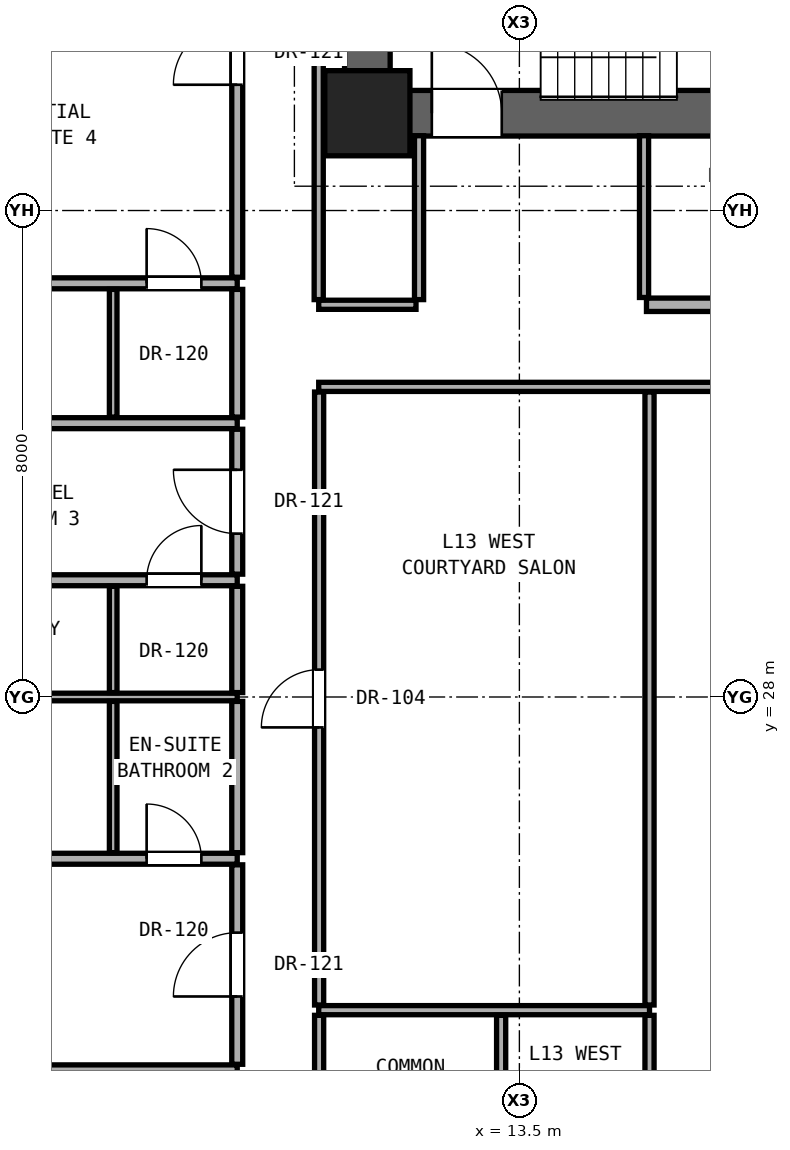
"""IFC4 building model, lengths in metres.
Left out: names, types, materials, properties, quantities, classifications, styles, units other than length and angle.
Written with IfcOpenShell. Run it as: python <this file> out.ifc"""

import sys

from ifc_helpers import new_model, si_unit, direction, frame, frame_2d, origin, origin_2d, place, context, subcontext, project, spatial, rectangle, extrude, element, fill, save


model = new_model("IFC4")
c1 = context("Model", 3, precision=1e-05, world=origin(), true_north=direction((0.0, 1.0)))
c2 = subcontext(c1, "Body", "Model", "MODEL_VIEW")
j1 = project(units=[si_unit("LENGTHUNIT", "METRE"), si_unit("PLANEANGLEUNIT", "RADIAN")], contexts=[c1])
p1 = place(None, origin())
s1 = spatial("IfcSite", under=j1, at=p1, CompositionType="ELEMENT")
p2 = place(p1, origin())
s2 = spatial("IfcBuilding", under=s1, at=p2, CompositionType="ELEMENT")
p3 = place(p2, frame((0.0, 0.0, 48.8)))
s3 = spatial("IfcBuildingStorey", under=s2, at=p3, CompositionType="ELEMENT", Elevation=48.8)
p4 = place(p3, frame((11.0, 37.6, 0.0), z_axis=(0.0, 0.0, 1.0), x_axis=(1.0, 0.0, 0.0)))
e1 = element("IfcColumn", 1, at=p4, inside=s3, PredefinedType="COLUMN", context=c2, shape_type="SweptSolid", body=[
    extrude(rectangle(XDim=1.4, YDim=1.4, at=origin_2d()), origin(), (0.0, 0.0, 1.0), 3.3),
])
p5 = place(p3, frame((11.0, 37.6, 0.0), z_axis=(0.0, 0.0, 1.0), x_axis=(0.0, 1.0, 0.0)))
e2 = element("IfcWall", 2, at=p5, inside=s3, PredefinedType="SHEAR", context=c2, shape_type="SweptSolid", body=[
    extrude(rectangle(XDim=6.0, YDim=0.75, at=frame_2d((3.0, 0.0))), origin(), (0.0, 0.0, 1.0), 3.06),
])
p6 = place(p3, frame((11.0, 37.6, 0.0), z_axis=(0.0, 0.0, 1.0), x_axis=(1.0, 0.0, 0.0)))
e3 = element("IfcWall", 3, at=p6, inside=s3, PredefinedType="SHEAR", context=c2, shape_type="SweptSolid", body=[
    extrude(rectangle(XDim=19.0, YDim=0.75, at=frame_2d((9.5, 0.0))), origin(), (0.0, 0.0, 1.0), 3.06),
])
p7 = place(p6, frame((1.06, 0.0, 0.0)))
e4 = element("IfcOpeningElement", 4, at=p7, cuts=e3, PredefinedType="OPENING", context=c2, shape_type="SweptSolid", body=[
    extrude(rectangle(XDim=1.15, YDim=2.2, at=frame_2d((0.575, 1.1))), frame((0.0, 0.385, 0.0), z_axis=(0.0, -1.0, 0.0), x_axis=(1.0, 0.0, 0.0)), (0.0, 0.0, 1.0), 0.77),
])
p8 = place(p6, frame((9.55, 0.0, 0.0)))
e5 = element("IfcOpeningElement", 5, at=p8, cuts=e3, PredefinedType="OPENING", context=c2, shape_type="SweptSolid", body=[
    extrude(rectangle(XDim=1.4, YDim=2.35, at=frame_2d((0.7, 1.175))), frame((0.0, 0.385, 0.0), z_axis=(0.0, -1.0, 0.0), x_axis=(1.0, 0.0, 0.0)), (0.0, 0.0, 1.0), 0.77),
])
p9 = place(p6, frame((11.95, 0.0, 0.0)))
e6 = element("IfcOpeningElement", 6, at=p9, cuts=e3, PredefinedType="OPENING", context=c2, shape_type="SweptSolid", body=[
    extrude(rectangle(XDim=1.4, YDim=2.35, at=frame_2d((0.7, 1.175))), frame((0.0, 0.385, 0.0), z_axis=(0.0, -1.0, 0.0), x_axis=(1.0, 0.0, 0.0)), (0.0, 0.0, 1.0), 0.77),
])
p10 = place(p6, frame((14.4, 0.0, 0.0)))
e7 = element("IfcOpeningElement", 7, at=p10, cuts=e3, PredefinedType="OPENING", context=c2, shape_type="SweptSolid", body=[
    extrude(rectangle(XDim=1.3, YDim=2.3, at=frame_2d((0.65, 1.15))), frame((0.0, 0.385, 0.0), z_axis=(0.0, -1.0, 0.0), x_axis=(1.0, 0.0, 0.0)), (0.0, 0.0, 1.0), 0.77),
])
p11 = place(p6, frame((16.6, 0.0, 0.0)))
e8 = element("IfcOpeningElement", 8, at=p11, cuts=e3, PredefinedType="OPENING", context=c2, shape_type="SweptSolid", body=[
    extrude(rectangle(XDim=1.3, YDim=2.3, at=frame_2d((0.65, 1.15))), frame((0.0, 0.385, 0.0), z_axis=(0.0, -1.0, 0.0), x_axis=(1.0, 0.0, 0.0)), (0.0, 0.0, 1.0), 0.77),
])
p12 = place(p3, frame((-2.72, 21.86, 0.0), z_axis=(0.0, 0.0, 1.0), x_axis=(1.0, 0.0, 0.0)))
e9 = element("IfcWall", 9, at=p12, inside=s3, PredefinedType="PARTITIONING", context=c2, shape_type="SweptSolid", body=[
    extrude(rectangle(XDim=11.58, YDim=0.18, at=frame_2d((5.79, 0.0))), origin(), (0.0, 0.0, 1.0), 2.125),
])
p13 = place(p3, frame((10.2, 22.85, 0.0), z_axis=(0.0, 0.0, 1.0), x_axis=(1.0, 0.0, 0.0)))
e10 = element("IfcWall", 10, at=p13, inside=s3, PredefinedType="PARTITIONING", context=c2, shape_type="SweptSolid", body=[
    extrude(rectangle(XDim=5.44, YDim=0.15, at=frame_2d((2.72, 0.0))), origin(), (0.0, 0.0, 1.0), 2.104),
])
p14 = place(p3, frame((-2.72, 25.34, 0.0), z_axis=(0.0, 0.0, 1.0), x_axis=(1.0, 0.0, 0.0)))
e11 = element("IfcWall", 11, at=p14, inside=s3, PredefinedType="PARTITIONING", context=c2, shape_type="SweptSolid", body=[
    extrude(rectangle(XDim=11.58, YDim=0.18, at=frame_2d((5.79, 0.0))), origin(), (0.0, 0.0, 1.0), 2.125),
])
p15 = place(p14, frame((3.015, 0.0, 0.0)))
e12 = element("IfcOpeningElement", 12, at=p15, cuts=e11, PredefinedType="OPENING", context=c2, shape_type="SweptSolid", body=[
    extrude(rectangle(XDim=0.85, YDim=2.01, at=frame_2d((0.425, 1.005))), frame((0.0, 0.1, 0.0), z_axis=(0.0, -1.0, 0.0), x_axis=(1.0, 0.0, 0.0)), (0.0, 0.0, 1.0), 0.2),
])
p16 = place(p14, frame((10.09, 0.0, 0.0)))
e13 = element("IfcOpeningElement", 13, at=p16, cuts=e11, PredefinedType="OPENING", context=c2, shape_type="SweptSolid", body=[
    extrude(rectangle(XDim=0.9, YDim=2.1, at=frame_2d((0.45, 1.05))), frame((0.0, 0.1, 0.0), z_axis=(0.0, -1.0, 0.0), x_axis=(1.0, 0.0, 0.0)), (0.0, 0.0, 1.0), 0.2),
])
p17 = place(p3, frame((-2.72, 28.0, 0.0), z_axis=(0.0, 0.0, 1.0), x_axis=(1.0, 0.0, 0.0)))
e14 = element("IfcWall", 14, at=p17, inside=s3, PredefinedType="PARTITIONING", context=c2, shape_type="SweptSolid", body=[
    extrude(rectangle(XDim=11.58, YDim=0.125, at=frame_2d((5.79, 0.0))), origin(), (0.0, 0.0, 1.0), 2.125),
])
p18 = place(p3, frame((-2.72, 29.92, 0.0), z_axis=(0.0, 0.0, 1.0), x_axis=(1.0, 0.0, 0.0)))
e15 = element("IfcWall", 15, at=p18, inside=s3, PredefinedType="PARTITIONING", context=c2, shape_type="SweptSolid", body=[
    extrude(rectangle(XDim=11.58, YDim=0.18, at=frame_2d((5.79, 0.0))), origin(), (0.0, 0.0, 1.0), 2.125),
])
p19 = place(p18, frame((3.015, 0.0, 0.0)))
e16 = element("IfcOpeningElement", 16, at=p19, cuts=e15, PredefinedType="OPENING", context=c2, shape_type="SweptSolid", body=[
    extrude(rectangle(XDim=0.85, YDim=2.01, at=frame_2d((0.425, 1.005))), frame((0.0, 0.1, 0.0), z_axis=(0.0, -1.0, 0.0), x_axis=(1.0, 0.0, 0.0)), (0.0, 0.0, 1.0), 0.2),
])
p20 = place(p18, frame((10.09, 0.0, 0.0)))
e17 = element("IfcOpeningElement", 17, at=p20, cuts=e15, PredefinedType="OPENING", context=c2, shape_type="SweptSolid", body=[
    extrude(rectangle(XDim=0.9, YDim=2.1, at=frame_2d((0.45, 1.05))), frame((0.0, 0.1, 0.0), z_axis=(0.0, -1.0, 0.0), x_axis=(1.0, 0.0, 0.0)), (0.0, 0.0, 1.0), 0.2),
])
p21 = place(p3, frame((-2.72, 32.503, 0.0), z_axis=(0.0, 0.0, 1.0), x_axis=(1.0, 0.0, 0.0)))
e18 = element("IfcWall", 18, at=p21, inside=s3, PredefinedType="PARTITIONING", context=c2, shape_type="SweptSolid", body=[
    extrude(rectangle(XDim=11.58, YDim=0.18, at=frame_2d((5.79, 0.0))), origin(), (0.0, 0.0, 1.0), 2.125),
])
p22 = place(p3, frame((10.2, 33.1, 0.0), z_axis=(0.0, 0.0, 1.0), x_axis=(1.0, 0.0, 0.0)))
e19 = element("IfcWall", 19, at=p22, inside=s3, PredefinedType="PARTITIONING", context=c2, shape_type="SweptSolid", body=[
    extrude(rectangle(XDim=20.6, YDim=0.15, at=frame_2d((10.3, 0.0))), origin(), (0.0, 0.0, 1.0), 2.104),
])
p23 = place(p22, frame((12.519, 0.0, 0.0)))
e20 = element("IfcOpeningElement", 20, at=p23, cuts=e19, PredefinedType="OPENING", context=c2, shape_type="SweptSolid", body=[
    extrude(rectangle(XDim=0.85, YDim=2.01, at=frame_2d((0.425, 1.005))), frame((0.0, 0.085, 0.0), z_axis=(0.0, -1.0, 0.0), x_axis=(1.0, 0.0, 0.0)), (0.0, 0.0, 1.0), 0.17),
])
p24 = place(p22, frame((17.654, 0.0, 0.0)))
e21 = element("IfcOpeningElement", 21, at=p24, cuts=e19, PredefinedType="OPENING", context=c2, shape_type="SweptSolid", body=[
    extrude(rectangle(XDim=0.85, YDim=2.01, at=frame_2d((0.425, 1.005))), frame((0.0, 0.085, 0.0), z_axis=(0.0, -1.0, 0.0), x_axis=(1.0, 0.0, 0.0)), (0.0, 0.0, 1.0), 0.17),
])
p25 = place(p3, frame((10.2, 34.45, 0.0), z_axis=(0.0, 0.0, 1.0), x_axis=(1.0, 0.0, 0.0)))
e22 = element("IfcWall", 22, at=p25, inside=s3, PredefinedType="PARTITIONING", context=c2, shape_type="SweptSolid", body=[
    extrude(rectangle(XDim=1.6, YDim=0.15, at=frame_2d((0.8, 0.0))), origin(), (0.0, 0.0, 1.0), 2.104),
])
p26 = place(p3, frame((15.59, 34.45, 0.0), z_axis=(0.0, 0.0, 1.0), x_axis=(1.0, 0.0, 0.0)))
e23 = element("IfcWall", 23, at=p26, inside=s3, PredefinedType="SOLIDWALL", context=c2, shape_type="SweptSolid", body=[
    extrude(rectangle(XDim=15.21, YDim=0.22, at=frame_2d((7.605, 0.0))), origin(), (0.0, 0.0, 1.0), 2.104),
])
p27 = place(p26, frame((6.435, 0.0, 0.0)))
e24 = element("IfcOpeningElement", 24, at=p27, cuts=e23, PredefinedType="OPENING", context=c2, shape_type="SweptSolid", body=[
    extrude(rectangle(XDim=0.85, YDim=2.01, at=frame_2d((0.425, 1.005))), frame((0.0, 0.12, 0.0), z_axis=(0.0, -1.0, 0.0), x_axis=(1.0, 0.0, 0.0)), (0.0, 0.0, 1.0), 0.24),
])
p28 = place(p26, frame((11.135, 0.0, 0.0)))
e25 = element("IfcOpeningElement", 25, at=p28, cuts=e23, PredefinedType="OPENING", context=c2, shape_type="SweptSolid", body=[
    extrude(rectangle(XDim=0.85, YDim=2.01, at=frame_2d((0.425, 1.005))), frame((0.0, 0.12, 0.0), z_axis=(0.0, -1.0, 0.0), x_axis=(1.0, 0.0, 0.0)), (0.0, 0.0, 1.0), 0.24),
])
p29 = place(p26, frame((1.775, 0.0, 0.0)))
e26 = element("IfcOpeningElement", 26, at=p29, cuts=e23, PredefinedType="OPENING", context=c2, shape_type="SweptSolid", body=[
    extrude(rectangle(XDim=0.85, YDim=2.01, at=frame_2d((0.425, 1.005))), frame((0.0, 0.12, 0.0), z_axis=(0.0, -1.0, 0.0), x_axis=(1.0, 0.0, 0.0)), (0.0, 0.0, 1.0), 0.24),
])
p30 = place(p3, frame((-2.72, 34.803, 0.0), z_axis=(0.0, 0.0, 1.0), x_axis=(1.0, 0.0, 0.0)))
e27 = element("IfcWall", 27, at=p30, inside=s3, PredefinedType="PARTITIONING", context=c2, shape_type="SweptSolid", body=[
    extrude(rectangle(XDim=11.58, YDim=0.18, at=frame_2d((5.79, 0.0))), origin(), (0.0, 0.0, 1.0), 2.125),
])
p31 = place(p30, frame((4.365, 0.0, 0.0)))
e28 = element("IfcOpeningElement", 28, at=p31, cuts=e27, PredefinedType="OPENING", context=c2, shape_type="SweptSolid", body=[
    extrude(rectangle(XDim=0.85, YDim=2.01, at=frame_2d((0.425, 1.005))), frame((0.0, 0.1, 0.0), z_axis=(0.0, -1.0, 0.0), x_axis=(1.0, 0.0, 0.0)), (0.0, 0.0, 1.0), 0.2),
])
p32 = place(p30, frame((10.09, 0.0, 0.0)))
e29 = element("IfcOpeningElement", 29, at=p32, cuts=e27, PredefinedType="OPENING", context=c2, shape_type="SweptSolid", body=[
    extrude(rectangle(XDim=0.9, YDim=2.1, at=frame_2d((0.45, 1.05))), frame((0.0, 0.1, 0.0), z_axis=(0.0, -1.0, 0.0), x_axis=(1.0, 0.0, 0.0)), (0.0, 0.0, 1.0), 0.2),
])
p33 = place(p3, frame((6.82, 25.44, 0.0), z_axis=(0.0, 0.0, 1.0), x_axis=(0.0, 1.0, 0.0)))
e30 = element("IfcWall", 30, at=p33, inside=s3, PredefinedType="PARTITIONING", context=c2, shape_type="SweptSolid", body=[
    extrude(rectangle(XDim=2.488, YDim=0.125, at=frame_2d((1.244, 0.0))), origin(), (0.0, 0.0, 1.0), 3.06),
])
p34 = place(p3, frame((6.82, 28.073, 0.0), z_axis=(0.0, 0.0, 1.0), x_axis=(0.0, 1.0, 0.0)))
e31 = element("IfcWall", 31, at=p34, inside=s3, PredefinedType="PARTITIONING", context=c2, shape_type="SweptSolid", body=[
    extrude(rectangle(XDim=1.748, YDim=0.125, at=frame_2d((0.874, 0.0))), origin(), (0.0, 0.0, 1.0), 3.06),
])
p35 = place(p3, frame((6.82, 32.603, 0.0), z_axis=(0.0, 0.0, 1.0), x_axis=(0.0, 1.0, 0.0)))
e32 = element("IfcWall", 32, at=p35, inside=s3, PredefinedType="PARTITIONING", context=c2, shape_type="SweptSolid", body=[
    extrude(rectangle(XDim=2.1, YDim=0.125, at=frame_2d((1.05, 0.0))), origin(), (0.0, 0.0, 1.0), 3.06),
])
p36 = place(p3, frame((8.86, 21.96, 0.0), z_axis=(0.0, 0.0, 1.0), x_axis=(0.0, 1.0, 0.0)))
e33 = element("IfcWall", 33, at=p36, inside=s3, PredefinedType="PARTITIONING", context=c2, shape_type="SweptSolid", body=[
    extrude(rectangle(XDim=3.28, YDim=0.18, at=frame_2d((1.64, 0.0))), origin(), (0.0, 0.0, 1.0), 2.279),
])
p37 = place(p36, frame((1.115, 0.0, 0.0)))
e34 = element("IfcOpeningElement", 34, at=p37, cuts=e33, PredefinedType="OPENING", context=c2, shape_type="SweptSolid", body=[
    extrude(rectangle(XDim=1.05, YDim=2.2, at=frame_2d((0.525, 1.1))), frame((0.0, 0.1, 0.0), z_axis=(0.0, -1.0, 0.0), x_axis=(1.0, 0.0, 0.0)), (0.0, 0.0, 1.0), 0.2),
])
p38 = place(p3, frame((8.86, 25.44, 0.0), z_axis=(0.0, 0.0, 1.0), x_axis=(0.0, 1.0, 0.0)))
e35 = element("IfcWall", 35, at=p38, inside=s3, PredefinedType="PARTITIONING", context=c2, shape_type="SweptSolid", body=[
    extrude(rectangle(XDim=2.488, YDim=0.18, at=frame_2d((1.244, 0.0))), origin(), (0.0, 0.0, 1.0), 3.06),
])
p39 = place(p3, frame((8.86, 28.073, 0.0), z_axis=(0.0, 0.0, 1.0), x_axis=(0.0, 1.0, 0.0)))
e36 = element("IfcWall", 36, at=p39, inside=s3, PredefinedType="PARTITIONING", context=c2, shape_type="SweptSolid", body=[
    extrude(rectangle(XDim=1.748, YDim=0.18, at=frame_2d((0.874, 0.0))), origin(), (0.0, 0.0, 1.0), 3.06),
])
p40 = place(p3, frame((8.86, 30.02, 0.0), z_axis=(0.0, 0.0, 1.0), x_axis=(0.0, 1.0, 0.0)))
e37 = element("IfcWall", 37, at=p40, inside=s3, PredefinedType="PARTITIONING", context=c2, shape_type="SweptSolid", body=[
    extrude(rectangle(XDim=2.383, YDim=0.18, at=frame_2d((1.191, 0.0))), origin(), (0.0, 0.0, 1.0), 2.279),
])
p41 = place(p40, frame((0.667, 0.0, 0.0)))
e38 = element("IfcOpeningElement", 38, at=p41, cuts=e37, PredefinedType="OPENING", context=c2, shape_type="SweptSolid", body=[
    extrude(rectangle(XDim=1.05, YDim=2.2, at=frame_2d((0.525, 1.1))), frame((0.0, 0.1, 0.0), z_axis=(0.0, -1.0, 0.0), x_axis=(1.0, 0.0, 0.0)), (0.0, 0.0, 1.0), 0.2),
])
p42 = place(p3, frame((8.86, 32.603, 0.0), z_axis=(0.0, 0.0, 1.0), x_axis=(0.0, 1.0, 0.0)))
e39 = element("IfcWall", 39, at=p42, inside=s3, PredefinedType="PARTITIONING", context=c2, shape_type="SweptSolid", body=[
    extrude(rectangle(XDim=2.1, YDim=0.18, at=frame_2d((1.05, 0.0))), origin(), (0.0, 0.0, 1.0), 3.06),
])
p43 = place(p3, frame((8.86, 34.903, 0.0), z_axis=(0.0, 0.0, 1.0), x_axis=(0.0, 1.0, 0.0)))
e40 = element("IfcWall", 40, at=p43, inside=s3, PredefinedType="PARTITIONING", context=c2, shape_type="SweptSolid", body=[
    extrude(rectangle(XDim=7.381, YDim=0.18, at=frame_2d((3.69, 0.0))), origin(), (0.0, 0.0, 1.0), 2.436),
])
p44 = place(p43, frame((3.166, 0.0, 0.0)))
e41 = element("IfcOpeningElement", 41, at=p44, cuts=e40, PredefinedType="OPENING", context=c2, shape_type="SweptSolid", body=[
    extrude(rectangle(XDim=1.05, YDim=2.2, at=frame_2d((0.525, 1.1))), frame((0.0, 0.1, 0.0), z_axis=(0.0, -1.0, 0.0), x_axis=(1.0, 0.0, 0.0)), (0.0, 0.0, 1.0), 0.2),
])
p45 = place(p3, frame((10.207, 19.985, 0.0), z_axis=(0.0, 0.0, 1.0), x_axis=(0.0, 1.0, 0.0)))
e42 = element("IfcWall", 42, at=p45, inside=s3, PredefinedType="PARTITIONING", context=c2, shape_type="SweptSolid", body=[
    extrude(rectangle(XDim=2.78, YDim=0.15, at=frame_2d((1.39, 0.0))), origin(), (0.0, 0.0, 1.0), 3.06),
])
p46 = place(p3, frame((10.207, 22.935, 0.0), z_axis=(0.0, 0.0, 1.0), x_axis=(0.0, 1.0, 0.0)))
e43 = element("IfcWall", 43, at=p46, inside=s3, PredefinedType="PARTITIONING", context=c2, shape_type="SweptSolid", body=[
    extrude(rectangle(XDim=10.08, YDim=0.15, at=frame_2d((5.04, 0.0))), origin(), (0.0, 0.0, 1.0), 2.279),
])
p47 = place(p46, frame((4.565, 0.0, 0.0)))
e44 = element("IfcOpeningElement", 44, at=p47, cuts=e43, PredefinedType="OPENING", context=c2, shape_type="SweptSolid", body=[
    extrude(rectangle(XDim=0.95, YDim=2.15, at=frame_2d((0.475, 1.075))), frame((0.0, 0.085, 0.0), z_axis=(0.0, -1.0, 0.0), x_axis=(1.0, 0.0, 0.0)), (0.0, 0.0, 1.0), 0.17),
])
p48 = place(p3, frame((10.2, 34.535, 0.0), z_axis=(0.0, 0.0, 1.0), x_axis=(0.0, 1.0, 0.0)))
e45 = element("IfcWall", 45, at=p48, inside=s3, PredefinedType="PARTITIONING", context=c2, shape_type="SweptSolid", body=[
    extrude(rectangle(XDim=9.13, YDim=0.15, at=frame_2d((4.565, 0.0))), origin(), (0.0, 0.0, 1.0), 2.436),
])
p49 = place(p3, frame((11.85, 34.535, 0.0), z_axis=(0.0, 0.0, 1.0), x_axis=(0.0, 1.0, 0.0)))
e46 = element("IfcWall", 46, at=p49, inside=s3, PredefinedType="PARTITIONING", context=c2, shape_type="SweptSolid", body=[
    extrude(rectangle(XDim=2.695, YDim=0.15, at=frame_2d((1.348, 0.0))), origin(), (0.0, 0.0, 1.0), 3.06),
])
p50 = place(p3, frame((13.2, 19.985, 0.0), z_axis=(0.0, 0.0, 1.0), x_axis=(0.0, 1.0, 0.0)))
e47 = element("IfcWall", 47, at=p50, inside=s3, PredefinedType="PARTITIONING", context=c2, shape_type="SweptSolid", body=[
    extrude(rectangle(XDim=2.78, YDim=0.15, at=frame_2d((1.39, 0.0))), origin(), (0.0, 0.0, 1.0), 3.06),
])
p51 = place(p3, frame((15.64, 19.985, 0.0), z_axis=(0.0, 0.0, 1.0), x_axis=(0.0, 1.0, 0.0)))
e48 = element("IfcWall", 48, at=p51, inside=s3, PredefinedType="PARTITIONING", context=c2, shape_type="SweptSolid", body=[
    extrude(rectangle(XDim=2.78, YDim=0.15, at=frame_2d((1.39, 0.0))), origin(), (0.0, 0.0, 1.0), 2.589),
])
p52 = place(p3, frame((15.64, 22.935, 0.0), z_axis=(0.0, 0.0, 1.0), x_axis=(0.0, 1.0, 0.0)))
e49 = element("IfcWall", 49, at=p52, inside=s3, PredefinedType="PARTITIONING", context=c2, shape_type="SweptSolid", body=[
    extrude(rectangle(XDim=10.08, YDim=0.15, at=frame_2d((5.04, 0.0))), origin(), (0.0, 0.0, 1.0), 2.104),
])
p53 = place(p3, frame((15.55, 34.57, 0.0), z_axis=(0.0, 0.0, 1.0), x_axis=(0.0, 1.0, 0.0)))
e50 = element("IfcWall", 50, at=p53, inside=s3, PredefinedType="PARTITIONING", context=c2, shape_type="SweptSolid", body=[
    extrude(rectangle(XDim=2.66, YDim=0.15, at=frame_2d((1.33, 0.0))), origin(), (0.0, 0.0, 1.0), 2.589),
])
p54 = place(p7, origin())
e51 = element("IfcDoor", 51, at=p54, inside=s3, OperationType="SINGLE_SWING_LEFT", PredefinedType="DOOR", context=c2, shape_type="SweptSolid", body=[
    extrude(rectangle(XDim=1.15, YDim=2.2, at=frame_2d((0.575, 1.1))), frame((0.0, 0.025, 0.0), z_axis=(0.0, -1.0, 0.0), x_axis=(1.0, 0.0, 0.0)), (0.0, 0.0, 1.0), 0.05),
])
fill(e4, e51)
p55 = place(p37, origin())
e52 = element("IfcDoor", 52, at=p55, inside=s3, OperationType="SINGLE_SWING_LEFT", PredefinedType="DOOR", context=c2, shape_type="SweptSolid", body=[
    extrude(rectangle(XDim=1.05, YDim=2.2, at=frame_2d((0.525, 1.1))), frame((0.0, 0.025, 0.0), z_axis=(0.0, -1.0, 0.0), x_axis=(1.0, 0.0, 0.0)), (0.0, 0.0, 1.0), 0.05),
])
fill(e34, e52)
p56 = place(p16, origin())
e53 = element("IfcDoor", 53, at=p56, inside=s3, OperationType="SINGLE_SWING_LEFT", PredefinedType="DOOR", context=c2, shape_type="SweptSolid", body=[
    extrude(rectangle(XDim=0.9, YDim=2.1, at=frame_2d((0.45, 1.05))), frame((0.0, 0.025, 0.0), z_axis=(0.0, -1.0, 0.0), x_axis=(1.0, 0.0, 0.0)), (0.0, 0.0, 1.0), 0.05),
])
fill(e13, e53)
p57 = place(p41, origin())
e54 = element("IfcDoor", 54, at=p57, inside=s3, OperationType="SINGLE_SWING_RIGHT", PredefinedType="DOOR", context=c2, shape_type="SweptSolid", body=[
    extrude(rectangle(XDim=1.05, YDim=2.2, at=frame_2d((0.525, 1.1))), frame((0.0, 0.025, 0.0), z_axis=(0.0, -1.0, 0.0), x_axis=(1.0, 0.0, 0.0)), (0.0, 0.0, 1.0), 0.05),
])
fill(e38, e54)
p58 = place(p20, origin())
e55 = element("IfcDoor", 55, at=p58, inside=s3, OperationType="SINGLE_SWING_RIGHT", PredefinedType="DOOR", context=c2, shape_type="SweptSolid", body=[
    extrude(rectangle(XDim=0.9, YDim=2.1, at=frame_2d((0.45, 1.05))), frame((0.0, 0.025, 0.0), z_axis=(0.0, -1.0, 0.0), x_axis=(1.0, 0.0, 0.0)), (0.0, 0.0, 1.0), 0.05),
])
fill(e17, e55)
p59 = place(p44, origin())
e56 = element("IfcDoor", 56, at=p59, inside=s3, OperationType="SINGLE_SWING_LEFT", PredefinedType="DOOR", context=c2, shape_type="SweptSolid", body=[
    extrude(rectangle(XDim=1.05, YDim=2.2, at=frame_2d((0.525, 1.1))), frame((0.0, 0.025, 0.0), z_axis=(0.0, -1.0, 0.0), x_axis=(1.0, 0.0, 0.0)), (0.0, 0.0, 1.0), 0.05),
])
fill(e41, e56)
p60 = place(p32, origin())
e57 = element("IfcDoor", 57, at=p60, inside=s3, OperationType="SINGLE_SWING_LEFT", PredefinedType="DOOR", context=c2, shape_type="SweptSolid", body=[
    extrude(rectangle(XDim=0.9, YDim=2.1, at=frame_2d((0.45, 1.05))), frame((0.0, 0.025, 0.0), z_axis=(0.0, -1.0, 0.0), x_axis=(1.0, 0.0, 0.0)), (0.0, 0.0, 1.0), 0.05),
])
fill(e29, e57)
p61 = place(p47, origin())
e58 = element("IfcDoor", 58, at=p61, inside=s3, OperationType="SINGLE_SWING_LEFT", PredefinedType="DOOR", context=c2, shape_type="SweptSolid", body=[
    extrude(rectangle(XDim=0.95, YDim=2.15, at=frame_2d((0.475, 1.075))), frame((0.0, 0.025, 0.0), z_axis=(0.0, -1.0, 0.0), x_axis=(1.0, 0.0, 0.0)), (0.0, 0.0, 1.0), 0.05),
])
fill(e44, e58)
save(model, sys.argv[1])
